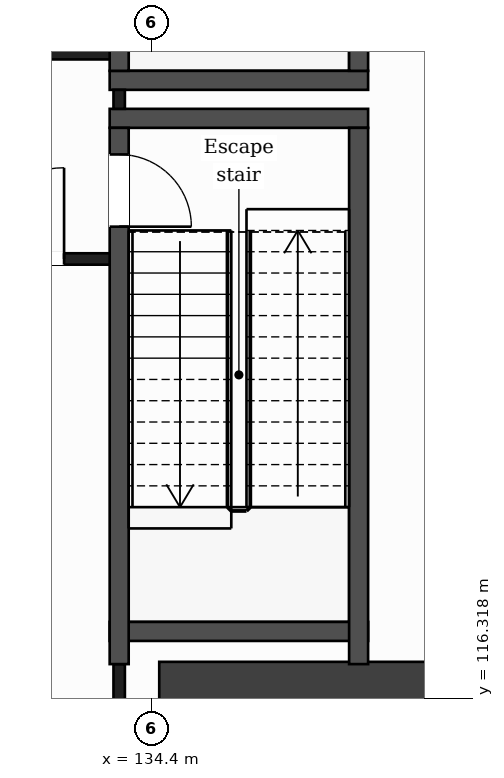
"""IFC4 building model, lengths in metres.
Left out: names, types, materials, properties, quantities, classifications, styles, units other than length and angle.
Written with IfcOpenShell. Run it as: python <this file> out.ifc"""

import sys

from ifc_helpers import new_model, si_unit, direction, frame, frame_2d, origin, place, context, subcontext, project, spatial, rectangle, extrude, element, fill, save


model = new_model("IFC4")
c1 = context("Model", 3, precision=1e-05, world=origin(), true_north=direction((0.0, 1.0)))
c2 = subcontext(c1, "Body", "Model", "MODEL_VIEW")
j1 = project(units=[si_unit("LENGTHUNIT", "METRE"), si_unit("PLANEANGLEUNIT", "RADIAN")], contexts=[c1])
p1 = place(None, origin())
s1 = spatial("IfcSite", under=j1, at=p1, CompositionType="ELEMENT")
p2 = place(p1, origin())
s2 = spatial("IfcBuilding", under=s1, at=p2, CompositionType="ELEMENT")
p3 = place(p2, frame((0.0, 0.0, 254.0)))
s3 = spatial("IfcBuildingStorey", under=s2, at=p3, CompositionType="ELEMENT", Elevation=254.0)
p4 = place(p3, frame((137.82, 132.0, 0.0), z_axis=(0.0, 0.0, 1.0), x_axis=(0.133408347329, -0.991061154956, 0.0)))
e1 = element("IfcWall", 1, at=p4, inside=s3, PredefinedType="SHEAR", context=c2, shape_type="SweptSolid", body=[
    extrude(rectangle(XDim=21.391, YDim=0.8, at=frame_2d((10.696, 0.0))), origin(), (0.0, 0.0, 1.0), 5.0),
])
p5 = place(p3, frame((134.5, 116.4, 0.0), z_axis=(0.0, 0.0, 1.0), x_axis=(1.0, 0.0, 0.0)))
e2 = element("IfcWall", 2, at=p5, inside=s3, PredefinedType="SHEAR", context=c2, shape_type="SweptSolid", body=[
    extrude(rectangle(XDim=5.077, YDim=0.8, at=frame_2d((2.539, 0.0))), origin(), (0.0, 0.0, 1.0), 5.0),
])
p6 = place(p3, frame((133.848, 117.2, 0.0), z_axis=(0.0, 0.0, 1.0), x_axis=(1.0, 0.0, 0.0)))
e3 = element("IfcWall", 3, at=p6, inside=s3, PredefinedType="PARTITIONING", context=c2, shape_type="SweptSolid", body=[
    extrude(rectangle(XDim=3.4, YDim=0.25, at=frame_2d((1.7, 0.0))), origin(), (0.0, 0.0, 1.0), 4.68),
])
p7 = place(p3, frame((131.573, 122.1, 0.0), z_axis=(0.0, 0.0, 1.0), x_axis=(1.0, 0.0, 0.0)))
e4 = element("IfcWall", 4, at=p7, inside=s3, PredefinedType="PARTITIONING", context=c2, shape_type="SweptSolid", body=[
    extrude(rectangle(XDim=2.4, YDim=0.15, at=frame_2d((1.2, 0.0))), origin(), (0.0, 0.0, 1.0), 4.68),
])
p8 = place(p7, frame((0.475, 0.0, 0.0)))
e5 = element("IfcOpeningElement", 5, at=p8, cuts=e4, PredefinedType="OPENING", context=c2, shape_type="SweptSolid", body=[
    extrude(rectangle(XDim=1.2, YDim=2.1, at=frame_2d((0.6, 1.05))), frame((0.0, 0.085, 0.0), z_axis=(0.0, -1.0, 0.0), x_axis=(1.0, 0.0, 0.0)), (0.0, 0.0, 1.0), 0.17),
])
for number, where, z_axis, x_axis in (
    (6, (133.848, 123.95, 0.0), (0.0, 0.0, 1.0), (1.0, 0.0, 0.0)),
    (7, (133.848, 124.45, 0.0), (0.0, 0.0, 1.0), (1.0, 0.0, 0.0)),
):
    element("IfcWall", number, at=place(p3, frame(where, z_axis=z_axis, x_axis=x_axis)), inside=s3, PredefinedType="PARTITIONING", context=c2, shape_type="SweptSolid", body=[
        extrude(rectangle(XDim=3.4, YDim=0.25, at=frame_2d((1.7, 0.0))), origin(), (0.0, 0.0, 1.0), 4.68),
    ])
p9 = place(p3, frame((131.582, 124.8, 0.0), z_axis=(0.0, 0.0, 1.0), x_axis=(1.0, 0.0, 0.0)))
e8 = element("IfcWall", 8, at=p9, inside=s3, PredefinedType="PARTITIONING", context=c2, shape_type="SweptSolid", body=[
    extrude(rectangle(XDim=2.516, YDim=0.15, at=frame_2d((1.258, 0.0))), origin(), (0.0, 0.0, 1.0), 4.68),
])
p10 = place(p3, frame((133.973, 116.0, 0.0), z_axis=(0.0, 0.0, 1.0), x_axis=(0.0, 1.0, 0.0)))
e9 = element("IfcWall", 9, at=p10, inside=s3, PredefinedType="PARTITIONING", context=c2, shape_type="SweptSolid", body=[
    extrude(rectangle(XDim=0.77, YDim=0.15, at=frame_2d((0.385, 0.0))), origin(), (0.0, 0.0, 1.0), 4.68),
])
p11 = place(p3, frame((133.973, 124.075, 0.0), z_axis=(0.0, 0.0, 1.0), x_axis=(0.0, 1.0, 0.0)))
e10 = element("IfcWall", 10, at=p11, inside=s3, PredefinedType="PARTITIONING", context=c2, shape_type="SweptSolid", body=[
    extrude(rectangle(XDim=0.25, YDim=0.15, at=frame_2d((0.125, 0.0))), origin(), (0.0, 0.0, 1.0), 4.68),
])
p12 = place(p3, frame((133.973, 116.77, 0.0), z_axis=(0.0, 0.0, 1.0), x_axis=(0.0, 1.0, 0.0)))
e11 = element("IfcWall", 11, at=p12, inside=s3, PredefinedType="PARTITIONING", context=c2, shape_type="SweptSolid", body=[
    extrude(rectangle(XDim=7.055, YDim=0.25, at=frame_2d((3.527, 0.0))), origin(), (0.0, 0.0, 1.0), 4.68),
])
p13 = place(p12, frame((5.755, 0.0, 0.0)))
e12 = element("IfcOpeningElement", 12, at=p13, cuts=e11, PredefinedType="OPENING", context=c2, shape_type="SweptSolid", body=[
    extrude(rectangle(XDim=0.95, YDim=2.1, at=frame_2d((0.475, 1.05))), frame((0.0, 0.135, 0.0), z_axis=(0.0, -1.0, 0.0), x_axis=(1.0, 0.0, 0.0)), (0.0, 0.0, 1.0), 0.27),
])
p14 = place(p3, frame((133.973, 124.575, 0.0), z_axis=(0.0, 0.0, 1.0), x_axis=(0.0, 1.0, 0.0)))
e13 = element("IfcWall", 13, at=p14, inside=s3, PredefinedType="PARTITIONING", context=c2, shape_type="SweptSolid", body=[
    extrude(rectangle(XDim=7.055, YDim=0.25, at=frame_2d((3.527, 0.0))), origin(), (0.0, 0.0, 1.0), 4.68),
])
p15 = place(p14, frame((5.325, 0.0, 0.0)))
e14 = element("IfcOpeningElement", 14, at=p15, cuts=e13, PredefinedType="OPENING", context=c2, shape_type="SweptSolid", body=[
    extrude(rectangle(XDim=1.0, YDim=2.1, at=frame_2d((0.5, 1.05))), frame((0.0, 0.135, 0.0), z_axis=(0.0, -1.0, 0.0), x_axis=(1.0, 0.0, 0.0)), (0.0, 0.0, 1.0), 0.27),
])
for number, where, z_axis, x_axis in (
    (15, (137.123, 116.77, 0.0), (0.0, 0.0, 1.0), (0.0, 1.0, 0.0)),
    (16, (137.123, 124.575, 0.0), (0.0, 0.0, 1.0), (0.0, 1.0, 0.0)),
):
    element("IfcWall", number, at=place(p3, frame(where, z_axis=z_axis, x_axis=x_axis)), inside=s3, PredefinedType="PARTITIONING", context=c2, shape_type="SweptSolid", body=[
        extrude(rectangle(XDim=7.055, YDim=0.25, at=frame_2d((3.527, 0.0))), origin(), (0.0, 0.0, 1.0), 4.68),
    ])
p16 = place(p8, origin())
e17 = element("IfcDoor", 17, at=p16, inside=s3, OperationType="SINGLE_SWING_RIGHT", PredefinedType="DOOR", context=c2, shape_type="SweptSolid", body=[
    extrude(rectangle(XDim=1.2, YDim=2.1, at=frame_2d((0.6, 1.05))), frame((0.0, 0.025, 0.0), z_axis=(0.0, -1.0, 0.0), x_axis=(1.0, 0.0, 0.0)), (0.0, 0.0, 1.0), 0.05),
])
fill(e5, e17)
p17 = place(p13, origin())
e18 = element("IfcDoor", 18, at=p17, inside=s3, OperationType="SINGLE_SWING_LEFT", PredefinedType="DOOR", context=c2, shape_type="SweptSolid", body=[
    extrude(rectangle(XDim=0.95, YDim=2.1, at=frame_2d((0.475, 1.05))), frame((0.0, 0.025, 0.0), z_axis=(0.0, -1.0, 0.0), x_axis=(1.0, 0.0, 0.0)), (0.0, 0.0, 1.0), 0.05),
])
fill(e12, e18)
save(model, sys.argv[1])
